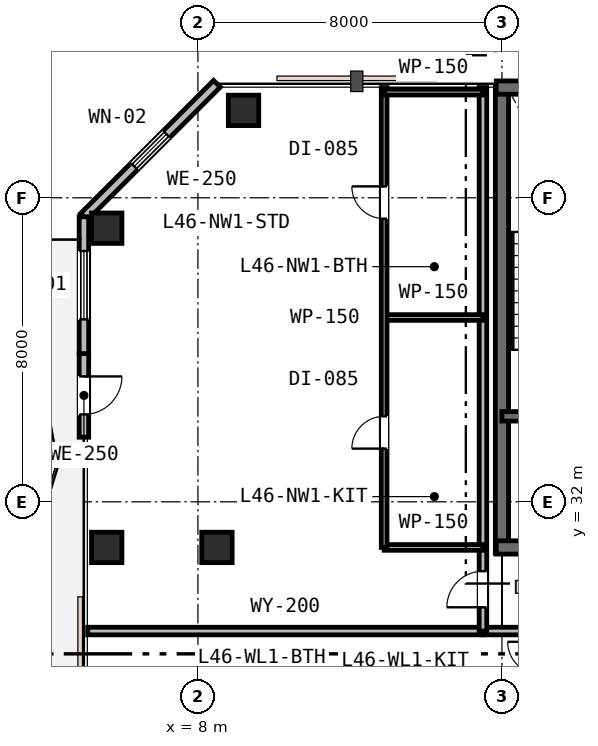
"""IFC4 building model, lengths in metres.
Left out: names, types, materials, properties, quantities, classifications, styles, units other than length and angle.
Written with IfcOpenShell. Run it as: python <this file> out.ifc"""

import sys

from ifc_helpers import new_model, si_unit, direction, frame, frame_2d, origin, origin_2d, place, context, subcontext, project, spatial, rectangle, extrude, element, fill, save


model = new_model("IFC4")
c1 = context("Model", 3, precision=1e-05, world=origin(), true_north=direction((0.0, 1.0)))
c2 = subcontext(c1, "Body", "Model", "MODEL_VIEW")
j1 = project(units=[si_unit("LENGTHUNIT", "METRE"), si_unit("PLANEANGLEUNIT", "RADIAN")], contexts=[c1])
p1 = place(None, origin())
s1 = spatial("IfcSite", under=j1, at=p1, CompositionType="ELEMENT")
p2 = place(p1, origin())
s2 = spatial("IfcBuilding", under=s1, at=p2, CompositionType="ELEMENT")
p3 = place(p2, frame((0.0, 0.0, 179.4)))
s3 = spatial("IfcBuildingStorey", under=s2, at=p3, CompositionType="ELEMENT", Elevation=179.4)
p4 = place(p3, frame((16.0, 30.65, 0.0), z_axis=(0.0, 0.0, 1.0), x_axis=(0.0, 1.0, 0.0)))
e1 = element("IfcWall", 1, at=p4, inside=s3, PredefinedType="SHEAR", context=c2, shape_type="SweptSolid", body=[
    extrude(rectangle(XDim=12.3, YDim=0.35, at=frame_2d((6.15, 0.0))), origin(), (0.0, 0.0, 1.0), 3.6),
])
p5 = place(p3, frame((15.85, 42.9, 0.0), z_axis=(0.0, 0.0, 1.0), x_axis=(1.0, 0.0, 0.0)))
e2 = element("IfcWall", 2, at=p5, inside=s3, PredefinedType="SHEAR", context=c2, shape_type="SweptSolid", body=[
    extrude(rectangle(XDim=24.3, YDim=0.35, at=frame_2d((12.15, 0.0))), origin(), (0.0, 0.0, 1.0), 3.6),
])
p6 = place(p3, frame((15.85, 30.8, 0.0), z_axis=(0.0, 0.0, 1.0), x_axis=(1.0, 0.0, 0.0)))
e3 = element("IfcWall", 3, at=p6, inside=s3, PredefinedType="SHEAR", context=c2, shape_type="SweptSolid", body=[
    extrude(rectangle(XDim=11.2, YDim=0.35, at=frame_2d((5.6, 0.0))), origin(), (0.0, 0.0, 1.0), 3.6),
])
p7 = place(p6, frame((2.45, 0.0, 0.0)))
e4 = element("IfcOpeningElement", 4, at=p7, cuts=e3, PredefinedType="OPENING", context=c2, shape_type="SweptSolid", body=[
    extrude(rectangle(XDim=1.1, YDim=2.15, at=frame_2d((0.55, 1.075))), frame((0.0, 0.185, 0.0), z_axis=(0.0, -1.0, 0.0), x_axis=(1.0, 0.0, 0.0)), (0.0, 0.0, 1.0), 0.37),
])
p8 = place(p3, frame((16.0, 34.25, 0.0), z_axis=(0.0, 0.0, 1.0), x_axis=(1.0, 0.0, 0.0)))
e5 = element("IfcWall", 5, at=p8, inside=s3, PredefinedType="SHEAR", context=c2, shape_type="SweptSolid", body=[
    extrude(rectangle(XDim=6.05, YDim=0.25, at=frame_2d((3.025, 0.0))), origin(), (0.0, 0.0, 1.0), 3.6),
])
p9 = place(p8, frame((1.25, 0.0, 0.0)))
e6 = element("IfcOpeningElement", 6, at=p9, cuts=e5, PredefinedType="OPENING", context=c2, shape_type="SweptSolid", body=[
    extrude(rectangle(XDim=1.0, YDim=2.15, at=frame_2d((0.5, 1.075))), frame((0.0, 0.135, 0.0), z_axis=(0.0, -1.0, 0.0), x_axis=(1.0, 0.0, 0.0)), (0.0, 0.0, 1.0), 0.27),
])
p10 = place(p8, frame((4.2, 0.0, 0.0)))
e7 = element("IfcOpeningElement", 7, at=p10, cuts=e5, PredefinedType="OPENING", context=c2, shape_type="SweptSolid", body=[
    extrude(rectangle(XDim=1.1, YDim=2.15, at=frame_2d((0.55, 1.075))), frame((0.0, 0.135, 0.0), z_axis=(0.0, -1.0, 0.0), x_axis=(1.0, 0.0, 0.0)), (0.0, 0.0, 1.0), 0.27),
])
for number, where, z_axis, x_axis in (
    (8, (5.6, 30.8, 0.0), (0.0, 0.0, 1.0), (1.0, 0.0, 0.0)),
    (9, (5.6, 39.2, 0.0), (0.0, 0.0, 1.0), (1.0, 0.0, 0.0)),
    (10, (8.5, 30.8, 0.0), (0.0, 0.0, 1.0), (1.0, 0.0, 0.0)),
    (11, (9.2, 42.3, 0.0), (0.0, 0.0, 1.0), (1.0, 0.0, 0.0)),
):
    element("IfcColumn", number, at=place(p3, frame(where, z_axis=z_axis, x_axis=x_axis)), inside=s3, PredefinedType="COLUMN", context=c2, shape_type="SweptSolid", body=[
        extrude(rectangle(XDim=0.8, YDim=0.8, at=origin_2d()), origin(), (0.0, 0.0, 1.0), 3.6),
    ])
p11 = place(p3, frame((8.5, 43.0, 0.0), z_axis=(0.0, 0.0, 1.0), x_axis=(-0.707106781187, -0.707106781187, 0.0)))
e12 = element("IfcWall", 12, at=p11, inside=s3, PredefinedType="STANDARD", context=c2, shape_type="SweptSolid", body=[
    extrude(rectangle(XDim=4.95, YDim=0.25, at=frame_2d((2.475, 0.0))), origin(), (0.0, 0.0, 1.0), 3.33),
])
p12 = place(p11, frame((1.875, 0.0, 0.85)))
e13 = element("IfcOpeningElement", 13, at=p12, cuts=e12, PredefinedType="OPENING", context=c2, shape_type="SweptSolid", body=[
    extrude(rectangle(XDim=1.2, YDim=1.6, at=frame_2d((0.6, 0.8))), frame((0.0, 0.135, 0.0), z_axis=(0.0, -1.0, 0.0), x_axis=(1.0, 0.0, 0.0)), (0.0, 0.0, 1.0), 0.27),
])
p13 = place(p3, frame((5.0, 35.9, 0.0), z_axis=(0.0, 0.0, 1.0), x_axis=(0.0, -1.0, 0.0)))
e14 = element("IfcWall", 14, at=p13, inside=s3, PredefinedType="STANDARD", context=c2, shape_type="SweptSolid", body=[
    extrude(rectangle(XDim=2.2, YDim=0.25, at=frame_2d((1.1, 0.0))), origin(), (0.0, 0.0, 1.0), 3.33),
])
p14 = place(p13, frame((0.6, 0.0, 0.0)))
e15 = element("IfcOpeningElement", 15, at=p14, cuts=e14, PredefinedType="OPENING", context=c2, shape_type="SweptSolid", body=[
    extrude(rectangle(XDim=1.0, YDim=2.15, at=frame_2d((0.5, 1.075))), frame((0.0, 0.135, 0.0), z_axis=(0.0, -1.0, 0.0), x_axis=(1.0, 0.0, 0.0)), (0.0, 0.0, 1.0), 0.27),
])
p15 = place(p3, frame((5.0, 39.5, 0.0), z_axis=(0.0, 0.0, 1.0), x_axis=(0.0, -1.0, 0.0)))
e16 = element("IfcWall", 16, at=p15, inside=s3, PredefinedType="STANDARD", context=c2, shape_type="SweptSolid", body=[
    extrude(rectangle(XDim=3.6, YDim=0.25, at=frame_2d((1.8, 0.0))), origin(), (0.0, 0.0, 1.0), 3.33),
])
p16 = place(p15, frame((0.9, 0.0, 0.75)))
e17 = element("IfcOpeningElement", 17, at=p16, cuts=e16, PredefinedType="OPENING", context=c2, shape_type="SweptSolid", body=[
    extrude(rectangle(XDim=1.8, YDim=1.85, at=frame_2d((0.9, 0.925))), frame((0.0, 0.135, 0.0), z_axis=(0.0, -1.0, 0.0), x_axis=(1.0, 0.0, 0.0)), (0.0, 0.0, 1.0), 0.27),
])
p17 = place(p3, frame((5.1, 28.6, 0.0), z_axis=(0.0, 0.0, 1.0), x_axis=(1.0, 0.0, 0.0)))
e18 = element("IfcWall", 18, at=p17, inside=s3, PredefinedType="PARTITIONING", context=c2, shape_type="SweptSolid", body=[
    extrude(rectangle(XDim=10.4, YDim=0.2, at=frame_2d((5.2, 0.0))), origin(), (0.0, 0.0, 1.0), 2.92),
])
p18 = place(p3, frame((15.5, 28.6, 0.0), z_axis=(0.0, 0.0, 1.0), x_axis=(1.0, 0.0, 0.0)))
e19 = element("IfcWall", 19, at=p18, inside=s3, PredefinedType="PARTITIONING", context=c2, shape_type="SweptSolid", body=[
    extrude(rectangle(XDim=4.1, YDim=0.2, at=frame_2d((2.05, 0.0))), origin(), (0.0, 0.0, 1.0), 2.92),
])
p19 = place(p3, frame((15.5, 28.6, 0.0), z_axis=(0.0, 0.0, 1.0), x_axis=(0.0, 1.0, 0.0)))
e20 = element("IfcWall", 20, at=p19, inside=s3, PredefinedType="PARTITIONING", context=c2, shape_type="SweptSolid", body=[
    extrude(rectangle(XDim=14.3, YDim=0.2, at=frame_2d((7.15, 0.0))), origin(), (0.0, 0.0, 1.0), 2.92),
])
p20 = place(p19, frame((0.625, 0.0, 0.0)))
e21 = element("IfcOpeningElement", 21, at=p20, cuts=e20, PredefinedType="OPENING", context=c2, shape_type="SweptSolid", body=[
    extrude(rectangle(XDim=0.95, YDim=2.15, at=frame_2d((0.475, 1.075))), frame((0.0, 0.11, 0.0), z_axis=(0.0, -1.0, 0.0), x_axis=(1.0, 0.0, 0.0)), (0.0, 0.0, 1.0), 0.22),
])
p21 = place(p3, frame((12.9, 30.8, 0.0), z_axis=(0.0, 0.0, 1.0), x_axis=(1.0, 0.0, 0.0)))
e22 = element("IfcWall", 22, at=p21, inside=s3, PredefinedType="PARTITIONING", context=c2, shape_type="SweptSolid", body=[
    extrude(rectangle(XDim=2.6, YDim=0.15, at=frame_2d((1.3, 0.0))), origin(), (0.0, 0.0, 1.0), 2.92),
])
p22 = place(p3, frame((12.9, 36.85, 0.0), z_axis=(0.0, 0.0, 1.0), x_axis=(1.0, 0.0, 0.0)))
e23 = element("IfcWall", 23, at=p22, inside=s3, PredefinedType="PARTITIONING", context=c2, shape_type="SweptSolid", body=[
    extrude(rectangle(XDim=2.6, YDim=0.15, at=frame_2d((1.3, 0.0))), origin(), (0.0, 0.0, 1.0), 3.33),
])
p23 = place(p3, frame((12.9, 30.8, 0.0), z_axis=(0.0, 0.0, 1.0), x_axis=(0.0, 1.0, 0.0)))
e24 = element("IfcWall", 24, at=p23, inside=s3, PredefinedType="PARTITIONING", context=c2, shape_type="SweptSolid", body=[
    extrude(rectangle(XDim=12.1, YDim=0.15, at=frame_2d((6.05, 0.0))), origin(), (0.0, 0.0, 1.0), 2.92),
])
p24 = place(p23, frame((2.6, 0.0, 0.0)))
e25 = element("IfcOpeningElement", 25, at=p24, cuts=e24, PredefinedType="OPENING", context=c2, shape_type="SweptSolid", body=[
    extrude(rectangle(XDim=0.85, YDim=2.15, at=frame_2d((0.425, 1.075))), frame((0.0, 0.085, 0.0), z_axis=(0.0, -1.0, 0.0), x_axis=(1.0, 0.0, 0.0)), (0.0, 0.0, 1.0), 0.17),
])
p25 = place(p23, frame((8.65, 0.0, 0.0)))
e26 = element("IfcOpeningElement", 26, at=p25, cuts=e24, PredefinedType="OPENING", context=c2, shape_type="SweptSolid", body=[
    extrude(rectangle(XDim=0.85, YDim=2.15, at=frame_2d((0.425, 1.075))), frame((0.0, 0.085, 0.0), z_axis=(0.0, -1.0, 0.0), x_axis=(1.0, 0.0, 0.0)), (0.0, 0.0, 1.0), 0.17),
])
p26 = place(p3, frame((12.9, 42.78, 0.0), z_axis=(0.0, 0.0, 1.0), x_axis=(1.0, 0.0, 0.0)))
e27 = element("IfcWall", 27, at=p26, inside=s3, PredefinedType="PARTITIONING", context=c2, shape_type="SweptSolid", body=[
    extrude(rectangle(XDim=2.6, YDim=0.15, at=frame_2d((1.3, 0.0))), origin(), (0.0, 0.0, 1.0), 3.33),
])
p27 = place(p12, origin())
e28 = element("IfcWindow", 28, at=p27, inside=s3, PartitioningType="SINGLE_PANEL", PredefinedType="WINDOW", context=c2, shape_type="SweptSolid", body=[
    extrude(rectangle(XDim=1.2, YDim=1.6, at=frame_2d((0.6, 0.8))), frame((0.0, 0.03, 0.0), z_axis=(0.0, -1.0, 0.0), x_axis=(1.0, 0.0, 0.0)), (0.0, 0.0, 1.0), 0.06),
])
fill(e13, e28)
p28 = place(p14, origin())
e29 = element("IfcDoor", 29, at=p28, inside=s3, OperationType="SINGLE_SWING_LEFT", PredefinedType="DOOR", context=c2, shape_type="SweptSolid", body=[
    extrude(rectangle(XDim=1.0, YDim=2.15, at=frame_2d((0.5, 1.075))), frame((0.0, 0.025, 0.0), z_axis=(0.0, -1.0, 0.0), x_axis=(1.0, 0.0, 0.0)), (0.0, 0.0, 1.0), 0.05),
])
fill(e15, e29)
p29 = place(p16, origin())
e30 = element("IfcWindow", 30, at=p29, inside=s3, PartitioningType="SINGLE_PANEL", PredefinedType="WINDOW", context=c2, shape_type="SweptSolid", body=[
    extrude(rectangle(XDim=1.8, YDim=1.85, at=frame_2d((0.9, 0.925))), frame((0.0, 0.03, 0.0), z_axis=(0.0, -1.0, 0.0), x_axis=(1.0, 0.0, 0.0)), (0.0, 0.0, 1.0), 0.06),
])
fill(e17, e30)
p30 = place(p20, origin())
e31 = element("IfcDoor", 31, at=p30, inside=s3, OperationType="SINGLE_SWING_LEFT", PredefinedType="DOOR", context=c2, shape_type="SweptSolid", body=[
    extrude(rectangle(XDim=0.95, YDim=2.15, at=frame_2d((0.475, 1.075))), frame((0.0, 0.025, 0.0), z_axis=(0.0, -1.0, 0.0), x_axis=(1.0, 0.0, 0.0)), (0.0, 0.0, 1.0), 0.05),
])
fill(e21, e31)
p31 = place(p24, origin())
e32 = element("IfcDoor", 32, at=p31, inside=s3, OperationType="SINGLE_SWING_LEFT", PredefinedType="DOOR", context=c2, shape_type="SweptSolid", body=[
    extrude(rectangle(XDim=0.85, YDim=2.15, at=frame_2d((0.425, 1.075))), frame((0.0, 0.025, 0.0), z_axis=(0.0, -1.0, 0.0), x_axis=(1.0, 0.0, 0.0)), (0.0, 0.0, 1.0), 0.05),
])
fill(e25, e32)
p32 = place(p25, origin())
e33 = element("IfcDoor", 33, at=p32, inside=s3, OperationType="SINGLE_SWING_RIGHT", PredefinedType="DOOR", context=c2, shape_type="SweptSolid", body=[
    extrude(rectangle(XDim=0.85, YDim=2.15, at=frame_2d((0.425, 1.075))), frame((0.0, 0.025, 0.0), z_axis=(0.0, -1.0, 0.0), x_axis=(1.0, 0.0, 0.0)), (0.0, 0.0, 1.0), 0.05),
])
fill(e26, e33)
save(model, sys.argv[1])
